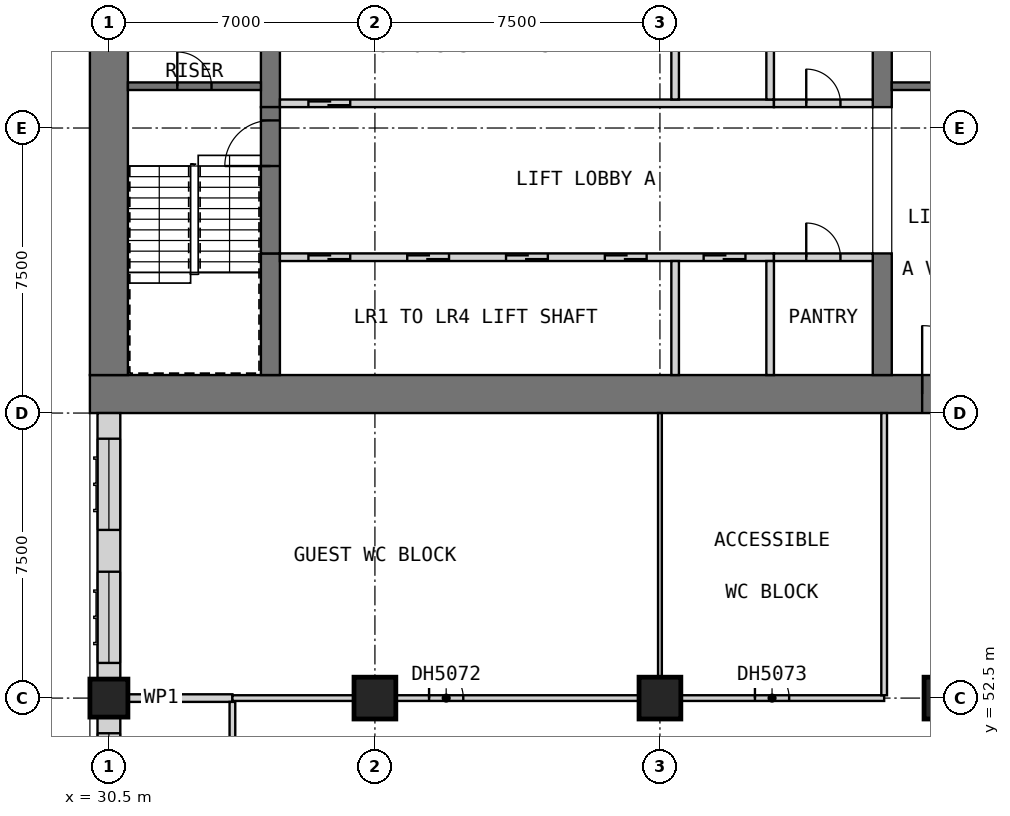
"""IFC4 building model, lengths in metres.
Left out: names, types, materials, properties, quantities, classifications, styles, units other than length and angle.
Written with IfcOpenShell. Run it as: python <this file> out.ifc"""

import sys

from ifc_helpers import new_model, si_unit, direction, frame, frame_2d, origin, origin_2d, place, context, subcontext, project, spatial, rectangle, extrude, element, fill, save


model = new_model("IFC4")
c1 = context("Model", 3, precision=1e-05, world=origin(), true_north=direction((0.0, 1.0)))
c2 = subcontext(c1, "Body", "Model", "MODEL_VIEW")
j1 = project(units=[si_unit("LENGTHUNIT", "METRE"), si_unit("PLANEANGLEUNIT", "RADIAN")], contexts=[c1])
p1 = place(None, origin())
s1 = spatial("IfcSite", under=j1, at=p1, CompositionType="ELEMENT")
p2 = place(p1, origin())
s2 = spatial("IfcBuilding", under=s1, at=p2, CompositionType="ELEMENT")
p3 = place(p2, frame((0.0, 0.0, 93.5)))
s3 = spatial("IfcBuildingStorey", under=s2, at=p3, CompositionType="ELEMENT", Elevation=93.5)
p4 = place(p3, frame((30.5, 52.5, 0.0), z_axis=(0.0, 0.0, 1.0), x_axis=(1.0, 0.0, 0.0)))
e1 = element("IfcColumn", 1, at=p4, inside=s3, PredefinedType="COLUMN", context=c2, shape_type="SweptSolid", body=[
    extrude(rectangle(XDim=1.0, YDim=1.0, at=origin_2d()), origin(), (0.0, 0.0, 1.0), 3.6),
])
for number, where, z_axis, x_axis in (
    (2, (37.5, 52.5, 0.0), (0.0, 0.0, 1.0), (1.0, 0.0, 0.0)),
    (3, (45.0, 52.5, 0.0), (0.0, 0.0, 1.0), (1.0, 0.0, 0.0)),
    (4, (52.5, 52.5, 0.0), (0.0, 0.0, 1.0), (1.0, 0.0, 0.0)),
):
    element("IfcColumn", number, at=place(p3, frame(where, z_axis=z_axis, x_axis=x_axis)), inside=s3, PredefinedType="COLUMN", context=c2, shape_type="SweptSolid", body=[
        extrude(rectangle(XDim=1.1, YDim=1.1, at=origin_2d()), origin(), (0.0, 0.0, 1.0), 3.6),
    ])
p5 = place(p3, frame((30.0, 60.5, 0.0), z_axis=(0.0, 0.0, 1.0), x_axis=(1.0, 0.0, 0.0)))
e5 = element("IfcWall", 5, at=p5, inside=s3, PredefinedType="SHEAR", context=c2, shape_type="SweptSolid", body=[
    extrude(rectangle(XDim=30.0, YDim=1.0, at=frame_2d((15.0, 0.0))), origin(), (0.0, 0.0, 1.0), 3.6),
])
p6 = place(p5, frame((21.9, 0.0, 0.0)))
e6 = element("IfcOpeningElement", 6, at=p6, cuts=e5, PredefinedType="OPENING", context=c2, shape_type="SweptSolid", body=[
    extrude(rectangle(XDim=1.8, YDim=2.1, at=frame_2d((0.9, 1.05))), frame((0.0, 0.51, 0.0), z_axis=(0.0, -1.0, 0.0), x_axis=(1.0, 0.0, 0.0)), (0.0, 0.0, 1.0), 1.02),
])
p7 = place(p5, frame((26.5, 0.0, 0.0)))
e7 = element("IfcOpeningElement", 7, at=p7, cuts=e5, PredefinedType="OPENING", context=c2, shape_type="SweptSolid", body=[
    extrude(rectangle(XDim=1.2, YDim=2.1, at=frame_2d((0.6, 1.05))), frame((0.0, 0.51, 0.0), z_axis=(0.0, -1.0, 0.0), x_axis=(1.0, 0.0, 0.0)), (0.0, 0.0, 1.0), 1.02),
])
p8 = place(p3, frame((30.5, 61.0, 0.0), z_axis=(0.0, 0.0, 1.0), x_axis=(0.0, 1.0, 0.0)))
e8 = element("IfcWall", 8, at=p8, inside=s3, PredefinedType="SHEAR", context=c2, shape_type="SweptSolid", body=[
    extrude(rectangle(XDim=20.5, YDim=1.0, at=frame_2d((10.25, 0.0))), origin(), (0.0, 0.0, 1.0), 3.6),
])
p9 = place(p3, frame((34.75, 61.0, 0.0), z_axis=(0.0, 0.0, 1.0), x_axis=(0.0, 1.0, 0.0)))
e9 = element("IfcWall", 9, at=p9, inside=s3, PredefinedType="SHEAR", context=c2, shape_type="SweptSolid", body=[
    extrude(rectangle(XDim=3.2, YDim=0.5, at=frame_2d((1.6, 0.0))), origin(), (0.0, 0.0, 1.0), 3.6),
])
p10 = place(p3, frame((34.75, 68.05, 0.0), z_axis=(0.0, 0.0, 1.0), x_axis=(0.0, 1.0, 0.0)))
e10 = element("IfcWall", 10, at=p10, inside=s3, PredefinedType="SHEAR", context=c2, shape_type="SweptSolid", body=[
    extrude(rectangle(XDim=6.4, YDim=0.5, at=frame_2d((3.2, 0.0))), origin(), (0.0, 0.0, 1.0), 3.6),
])
p11 = place(p3, frame((50.85, 61.0, 0.0), z_axis=(0.0, 0.0, 1.0), x_axis=(0.0, 1.0, 0.0)))
e11 = element("IfcWall", 11, at=p11, inside=s3, PredefinedType="SHEAR", context=c2, shape_type="SweptSolid", body=[
    extrude(rectangle(XDim=3.2, YDim=0.5, at=frame_2d((1.6, 0.0))), origin(), (0.0, 0.0, 1.0), 3.6),
])
p12 = place(p3, frame((50.85, 68.05, 0.0), z_axis=(0.0, 0.0, 1.0), x_axis=(0.0, 1.0, 0.0)))
e12 = element("IfcWall", 12, at=p12, inside=s3, PredefinedType="SHEAR", context=c2, shape_type="SweptSolid", body=[
    extrude(rectangle(XDim=6.4, YDim=0.5, at=frame_2d((3.2, 0.0))), origin(), (0.0, 0.0, 1.0), 3.6),
])
p13 = place(p2, frame((0.0, 0.0, 34.0)))
s4 = spatial("IfcBuildingStorey", under=s2, at=p13, CompositionType="ELEMENT", Elevation=34.0)
for number, where, z_axis, x_axis in (
    (13, (29.7, 61.05, 0.0), (0.0, 0.0, 1.0), (0.0, 1.0, 0.0)),
    (14, (29.7, 65.925, 0.0), (0.0, 0.0, 1.0), (0.0, 1.0, 0.0)),
):
    element("IfcWall", number, at=place(p13, frame(where, z_axis=z_axis, x_axis=x_axis)), inside=s4, PredefinedType="SOLIDWALL", context=c2, shape_type="SweptSolid", body=[
        extrude(rectangle(XDim=0.9, YDim=0.6, at=frame_2d((0.45, 0.0))), origin(), (0.0, 0.0, 1.0), 286.2),
    ])
p14 = place(p3, frame((30.5, 60.0, 0.0), z_axis=(0.0, 0.0, 1.0), x_axis=(0.0, -1.0, 0.0)))
e15 = element("IfcWall", 15, at=p14, inside=s3, PredefinedType="SOLIDWALL", context=c2, shape_type="SweptSolid", body=[
    extrude(rectangle(XDim=7.0, YDim=0.6, at=frame_2d((3.5, 0.0))), origin(), (0.0, 0.0, 1.0), 3.35),
])
p15 = place(p14, frame((4.175, 0.0, 0.8)))
e16 = element("IfcOpeningElement", 16, at=p15, cuts=e15, PredefinedType="OPENING", context=c2, shape_type="SweptSolid", body=[
    extrude(rectangle(XDim=2.4, YDim=1.8, at=frame_2d((1.2, 0.9))), frame((0.0, 0.31, 0.0), z_axis=(0.0, -1.0, 0.0), x_axis=(1.0, 0.0, 0.0)), (0.0, 0.0, 1.0), 0.62),
])
p16 = place(p14, frame((0.675, 0.0, 0.8)))
e17 = element("IfcOpeningElement", 17, at=p16, cuts=e15, PredefinedType="OPENING", context=c2, shape_type="SweptSolid", body=[
    extrude(rectangle(XDim=2.4, YDim=1.8, at=frame_2d((1.2, 0.9))), frame((0.0, 0.31, 0.0), z_axis=(0.0, -1.0, 0.0), x_axis=(1.0, 0.0, 0.0)), (0.0, 0.0, 1.0), 0.62),
])
p17 = place(p3, frame((30.5, 52.0, 0.0), z_axis=(0.0, 0.0, 1.0), x_axis=(0.0, -1.0, 0.0)))
e18 = element("IfcWall", 18, at=p17, inside=s3, PredefinedType="SOLIDWALL", context=c2, shape_type="SweptSolid", body=[
    extrude(rectangle(XDim=6.0, YDim=0.6, at=frame_2d((3.0, 0.0))), origin(), (0.0, 0.0, 1.0), 2.85),
])
p18 = place(p17, frame((3.425, 0.0, 0.8)))
e19 = element("IfcOpeningElement", 19, at=p18, cuts=e18, PredefinedType="OPENING", context=c2, shape_type="SweptSolid", body=[
    extrude(rectangle(XDim=2.4, YDim=1.8, at=frame_2d((1.2, 0.9))), frame((0.0, 0.31, 0.0), z_axis=(0.0, -1.0, 0.0), x_axis=(1.0, 0.0, 0.0)), (0.0, 0.0, 1.0), 0.62),
])
p19 = place(p17, frame((0.425, 0.0, 0.8)))
e20 = element("IfcOpeningElement", 20, at=p19, cuts=e18, PredefinedType="OPENING", context=c2, shape_type="SweptSolid", body=[
    extrude(rectangle(XDim=2.4, YDim=1.8, at=frame_2d((1.2, 0.9))), frame((0.0, 0.31, 0.0), z_axis=(0.0, -1.0, 0.0), x_axis=(1.0, 0.0, 0.0)), (0.0, 0.0, 1.0), 0.62),
])
p20 = place(p3, frame((35.0, 64.1, 0.0), z_axis=(0.0, 0.0, 1.0), x_axis=(1.0, 0.0, 0.0)))
e21 = element("IfcWall", 21, at=p20, inside=s3, PredefinedType="SOLIDWALL", context=c2, shape_type="SweptSolid", body=[
    extrude(rectangle(XDim=13.0, YDim=0.2, at=frame_2d((6.5, 0.0))), origin(), (0.0, 0.0, 1.0), 3.6),
])
p21 = place(p20, frame((0.75, 0.0, 0.0)))
e22 = element("IfcOpeningElement", 22, at=p21, cuts=e21, PredefinedType="OPENING", context=c2, shape_type="SweptSolid", body=[
    extrude(rectangle(XDim=1.1, YDim=2.1, at=frame_2d((0.55, 1.05))), frame((0.0, 0.11, 0.0), z_axis=(0.0, -1.0, 0.0), x_axis=(1.0, 0.0, 0.0)), (0.0, 0.0, 1.0), 0.22),
])
p22 = place(p20, frame((3.35, 0.0, 0.0)))
e23 = element("IfcOpeningElement", 23, at=p22, cuts=e21, PredefinedType="OPENING", context=c2, shape_type="SweptSolid", body=[
    extrude(rectangle(XDim=1.1, YDim=2.1, at=frame_2d((0.55, 1.05))), frame((0.0, 0.11, 0.0), z_axis=(0.0, -1.0, 0.0), x_axis=(1.0, 0.0, 0.0)), (0.0, 0.0, 1.0), 0.22),
])
p23 = place(p20, frame((5.95, 0.0, 0.0)))
e24 = element("IfcOpeningElement", 24, at=p23, cuts=e21, PredefinedType="OPENING", context=c2, shape_type="SweptSolid", body=[
    extrude(rectangle(XDim=1.1, YDim=2.1, at=frame_2d((0.55, 1.05))), frame((0.0, 0.11, 0.0), z_axis=(0.0, -1.0, 0.0), x_axis=(1.0, 0.0, 0.0)), (0.0, 0.0, 1.0), 0.22),
])
p24 = place(p20, frame((8.55, 0.0, 0.0)))
e25 = element("IfcOpeningElement", 25, at=p24, cuts=e21, PredefinedType="OPENING", context=c2, shape_type="SweptSolid", body=[
    extrude(rectangle(XDim=1.1, YDim=2.1, at=frame_2d((0.55, 1.05))), frame((0.0, 0.11, 0.0), z_axis=(0.0, -1.0, 0.0), x_axis=(1.0, 0.0, 0.0)), (0.0, 0.0, 1.0), 0.22),
])
p25 = place(p20, frame((11.15, 0.0, 0.0)))
e26 = element("IfcOpeningElement", 26, at=p25, cuts=e21, PredefinedType="OPENING", context=c2, shape_type="SweptSolid", body=[
    extrude(rectangle(XDim=1.1, YDim=2.1, at=frame_2d((0.55, 1.05))), frame((0.0, 0.11, 0.0), z_axis=(0.0, -1.0, 0.0), x_axis=(1.0, 0.0, 0.0)), (0.0, 0.0, 1.0), 0.22),
])
for number, where, z_axis, x_axis in (
    (27, (45.4, 61.0, 0.0), (0.0, 0.0, 1.0), (0.0, 1.0, 0.0)),
    (28, (47.9, 61.0, 0.0), (0.0, 0.0, 1.0), (0.0, 1.0, 0.0)),
):
    element("IfcWall", number, at=place(p3, frame(where, z_axis=z_axis, x_axis=x_axis)), inside=s3, PredefinedType="SOLIDWALL", context=c2, shape_type="SweptSolid", body=[
        extrude(rectangle(XDim=3.0, YDim=0.2, at=frame_2d((1.5, 0.0))), origin(), (0.0, 0.0, 1.0), 3.6),
    ])
p26 = place(p3, frame((48.0, 64.1, 0.0), z_axis=(0.0, 0.0, 1.0), x_axis=(1.0, 0.0, 0.0)))
e29 = element("IfcWall", 29, at=p26, inside=s3, PredefinedType="PARTITIONING", context=c2, shape_type="SweptSolid", body=[
    extrude(rectangle(XDim=2.6, YDim=0.2, at=frame_2d((1.3, 0.0))), origin(), (0.0, 0.0, 1.0), 3.35),
])
p27 = place(p26, frame((0.85, 0.0, 0.0)))
e30 = element("IfcOpeningElement", 30, at=p27, cuts=e29, PredefinedType="OPENING", context=c2, shape_type="SweptSolid", body=[
    extrude(rectangle(XDim=0.9, YDim=2.1, at=frame_2d((0.45, 1.05))), frame((0.0, 0.11, 0.0), z_axis=(0.0, -1.0, 0.0), x_axis=(1.0, 0.0, 0.0)), (0.0, 0.0, 1.0), 0.22),
])
p28 = place(p3, frame((35.0, 68.15, 0.0), z_axis=(0.0, 0.0, 1.0), x_axis=(1.0, 0.0, 0.0)))
e31 = element("IfcWall", 31, at=p28, inside=s3, PredefinedType="SOLIDWALL", context=c2, shape_type="SweptSolid", body=[
    extrude(rectangle(XDim=13.0, YDim=0.2, at=frame_2d((6.5, 0.0))), origin(), (0.0, 0.0, 1.0), 3.6),
])
p29 = place(p28, frame((0.75, 0.0, 0.0)))
e32 = element("IfcOpeningElement", 32, at=p29, cuts=e31, PredefinedType="OPENING", context=c2, shape_type="SweptSolid", body=[
    extrude(rectangle(XDim=1.1, YDim=2.1, at=frame_2d((0.55, 1.05))), frame((0.0, 0.11, 0.0), z_axis=(0.0, -1.0, 0.0), x_axis=(1.0, 0.0, 0.0)), (0.0, 0.0, 1.0), 0.22),
])
for number, where, z_axis, x_axis in (
    (33, (45.4, 68.25, 0.0), (0.0, 0.0, 1.0), (0.0, 1.0, 0.0)),
    (34, (47.9, 68.25, 0.0), (0.0, 0.0, 1.0), (0.0, 1.0, 0.0)),
):
    element("IfcWall", number, at=place(p3, frame(where, z_axis=z_axis, x_axis=x_axis)), inside=s3, PredefinedType="SOLIDWALL", context=c2, shape_type="SweptSolid", body=[
        extrude(rectangle(XDim=2.75, YDim=0.2, at=frame_2d((1.375, 0.0))), origin(), (0.0, 0.0, 1.0), 3.6),
    ])
p30 = place(p3, frame((48.0, 68.15, 0.0), z_axis=(0.0, 0.0, 1.0), x_axis=(1.0, 0.0, 0.0)))
e35 = element("IfcWall", 35, at=p30, inside=s3, PredefinedType="PARTITIONING", context=c2, shape_type="SweptSolid", body=[
    extrude(rectangle(XDim=2.6, YDim=0.2, at=frame_2d((1.3, 0.0))), origin(), (0.0, 0.0, 1.0), 3.35),
])
p31 = place(p30, frame((0.85, 0.0, 0.0)))
e36 = element("IfcOpeningElement", 36, at=p31, cuts=e35, PredefinedType="OPENING", context=c2, shape_type="SweptSolid", body=[
    extrude(rectangle(XDim=0.9, YDim=2.1, at=frame_2d((0.45, 1.05))), frame((0.0, 0.11, 0.0), z_axis=(0.0, -1.0, 0.0), x_axis=(1.0, 0.0, 0.0)), (0.0, 0.0, 1.0), 0.22),
])
p32 = place(p3, frame((34.75, 64.2, 0.0), z_axis=(0.0, 0.0, 1.0), x_axis=(0.0, 1.0, 0.0)))
e37 = element("IfcWall", 37, at=p32, inside=s3, PredefinedType="SOLIDWALL", context=c2, shape_type="SweptSolid", body=[
    extrude(rectangle(XDim=3.85, YDim=0.5, at=frame_2d((1.925, 0.0))), origin(), (0.0, 0.0, 1.0), 2.4),
])
p33 = place(p32, frame((2.3, 0.0, 0.0)))
e38 = element("IfcOpeningElement", 38, at=p33, cuts=e37, PredefinedType="OPENING", context=c2, shape_type="SweptSolid", body=[
    extrude(rectangle(XDim=1.2, YDim=2.1, at=frame_2d((0.6, 1.05))), frame((0.0, 0.26, 0.0), z_axis=(0.0, -1.0, 0.0), x_axis=(1.0, 0.0, 0.0)), (0.0, 0.0, 1.0), 0.52),
])
p34 = place(p3, frame((31.0, 68.6, 0.0), z_axis=(0.0, 0.0, 1.0), x_axis=(1.0, 0.0, 0.0)))
e39 = element("IfcWall", 39, at=p34, inside=s3, PredefinedType="SOLIDWALL", context=c2, shape_type="SweptSolid", body=[
    extrude(rectangle(XDim=3.5, YDim=0.2, at=frame_2d((1.75, 0.0))), origin(), (0.0, 0.0, 1.0), 3.35),
])
p35 = place(p34, frame((1.3, 0.0, 0.0)))
e40 = element("IfcOpeningElement", 40, at=p35, cuts=e39, PredefinedType="OPENING", context=c2, shape_type="SweptSolid", body=[
    extrude(rectangle(XDim=0.9, YDim=2.1, at=frame_2d((0.45, 1.05))), frame((0.0, 0.11, 0.0), z_axis=(0.0, -1.0, 0.0), x_axis=(1.0, 0.0, 0.0)), (0.0, 0.0, 1.0), 0.22),
])
p36 = place(p3, frame((51.1, 68.6, 0.0), z_axis=(0.0, 0.0, 1.0), x_axis=(1.0, 0.0, 0.0)))
e41 = element("IfcWall", 41, at=p36, inside=s3, PredefinedType="SOLIDWALL", context=c2, shape_type="SweptSolid", body=[
    extrude(rectangle(XDim=7.9, YDim=0.2, at=frame_2d((3.95, 0.0))), origin(), (0.0, 0.0, 1.0), 3.35),
])
p37 = place(p3, frame((30.0, 52.5, 0.0), z_axis=(0.0, 0.0, 1.0), x_axis=(1.0, 0.0, 0.0)))
e42 = element("IfcWall", 42, at=p37, inside=s3, PredefinedType="PARTITIONING", context=c2, shape_type="SweptSolid", body=[
    extrude(rectangle(XDim=3.75, YDim=0.2, at=frame_2d((1.875, 0.0))), origin(), (0.0, 0.0, 1.0), 3.35),
])
p38 = place(p3, frame((33.75, 52.5, 0.0), z_axis=(0.0, 0.0, 1.0), x_axis=(1.0, 0.0, 0.0)))
e43 = element("IfcWall", 43, at=p38, inside=s3, PredefinedType="PARTITIONING", context=c2, shape_type="SweptSolid", body=[
    extrude(rectangle(XDim=17.15, YDim=0.15, at=frame_2d((8.575, 0.0))), origin(), (0.0, 0.0, 1.0), 3.35),
])
p39 = place(p38, frame((5.175, 0.0, 0.0)))
e44 = element("IfcOpeningElement", 44, at=p39, cuts=e43, PredefinedType="OPENING", context=c2, shape_type="SweptSolid", body=[
    extrude(rectangle(XDim=0.9, YDim=2.1, at=frame_2d((0.45, 1.05))), frame((0.0, 0.085, 0.0), z_axis=(0.0, -1.0, 0.0), x_axis=(1.0, 0.0, 0.0)), (0.0, 0.0, 1.0), 0.17),
])
p40 = place(p38, frame((13.75, 0.0, 0.0)))
e45 = element("IfcOpeningElement", 45, at=p40, cuts=e43, PredefinedType="OPENING", context=c2, shape_type="SweptSolid", body=[
    extrude(rectangle(XDim=0.9, YDim=2.1, at=frame_2d((0.45, 1.05))), frame((0.0, 0.085, 0.0), z_axis=(0.0, -1.0, 0.0), x_axis=(1.0, 0.0, 0.0)), (0.0, 0.0, 1.0), 0.17),
])
p41 = place(p3, frame((33.75, 50.175, 0.0), z_axis=(0.0, 0.0, 1.0), x_axis=(0.0, 1.0, 0.0)))
e46 = element("IfcWall", 46, at=p41, inside=s3, PredefinedType="PARTITIONING", context=c2, shape_type="SweptSolid", body=[
    extrude(rectangle(XDim=2.225, YDim=0.15, at=frame_2d((1.112, 0.0))), origin(), (0.0, 0.0, 1.0), 3.35),
])
p42 = place(p3, frame((45.0, 52.575, 0.0), z_axis=(0.0, 0.0, 1.0), x_axis=(0.0, 1.0, 0.0)))
e47 = element("IfcWall", 47, at=p42, inside=s3, PredefinedType="PARTITIONING", context=c2, shape_type="SweptSolid", body=[
    extrude(rectangle(XDim=7.425, YDim=0.1, at=frame_2d((3.712, 0.0))), origin(), (0.0, 0.0, 1.0), 3.35),
])
p43 = place(p3, frame((50.9, 52.575, 0.0), z_axis=(0.0, 0.0, 1.0), x_axis=(0.0, 1.0, 0.0)))
e48 = element("IfcWall", 48, at=p43, inside=s3, PredefinedType="PARTITIONING", context=c2, shape_type="SweptSolid", body=[
    extrude(rectangle(XDim=7.425, YDim=0.15, at=frame_2d((3.712, 0.0))), origin(), (0.0, 0.0, 1.0), 3.35),
])
p44 = place(p15, origin())
e49 = element("IfcWindow", 49, at=p44, inside=s3, PartitioningType="SINGLE_PANEL", PredefinedType="WINDOW", context=c2, shape_type="SweptSolid", body=[
    extrude(rectangle(XDim=2.4, YDim=1.8, at=frame_2d((1.2, 0.9))), frame((0.0, -0.07, 0.0), z_axis=(0.0, -1.0, 0.0), x_axis=(1.0, 0.0, 0.0)), (0.0, 0.0, 1.0), 0.06),
])
fill(e16, e49)
p45 = place(p16, origin())
e50 = element("IfcWindow", 50, at=p45, inside=s3, PartitioningType="SINGLE_PANEL", PredefinedType="WINDOW", context=c2, shape_type="SweptSolid", body=[
    extrude(rectangle(XDim=2.4, YDim=1.8, at=frame_2d((1.2, 0.9))), frame((0.0, -0.07, 0.0), z_axis=(0.0, -1.0, 0.0), x_axis=(1.0, 0.0, 0.0)), (0.0, 0.0, 1.0), 0.06),
])
fill(e17, e50)
p46 = place(p19, origin())
e51 = element("IfcWindow", 51, at=p46, inside=s3, PartitioningType="SINGLE_PANEL", PredefinedType="WINDOW", context=c2, shape_type="SweptSolid", body=[
    extrude(rectangle(XDim=2.4, YDim=1.8, at=frame_2d((1.2, 0.9))), frame((0.0, -0.07, 0.0), z_axis=(0.0, -1.0, 0.0), x_axis=(1.0, 0.0, 0.0)), (0.0, 0.0, 1.0), 0.06),
])
fill(e20, e51)
p47 = place(p21, origin())
e52 = element("IfcDoor", 52, at=p47, inside=s3, OperationType="DOUBLE_DOOR_SLIDING", PredefinedType="DOOR", context=c2, shape_type="SweptSolid", body=[
    extrude(rectangle(XDim=1.1, YDim=2.1, at=frame_2d((0.55, 1.05))), frame((0.0, 0.025, 0.0), z_axis=(0.0, -1.0, 0.0), x_axis=(1.0, 0.0, 0.0)), (0.0, 0.0, 1.0), 0.05),
])
fill(e22, e52)
p48 = place(p22, origin())
e53 = element("IfcDoor", 53, at=p48, inside=s3, OperationType="DOUBLE_DOOR_SLIDING", PredefinedType="DOOR", context=c2, shape_type="SweptSolid", body=[
    extrude(rectangle(XDim=1.1, YDim=2.1, at=frame_2d((0.55, 1.05))), frame((0.0, 0.025, 0.0), z_axis=(0.0, -1.0, 0.0), x_axis=(1.0, 0.0, 0.0)), (0.0, 0.0, 1.0), 0.05),
])
fill(e23, e53)
p49 = place(p23, origin())
e54 = element("IfcDoor", 54, at=p49, inside=s3, OperationType="DOUBLE_DOOR_SLIDING", PredefinedType="DOOR", context=c2, shape_type="SweptSolid", body=[
    extrude(rectangle(XDim=1.1, YDim=2.1, at=frame_2d((0.55, 1.05))), frame((0.0, 0.025, 0.0), z_axis=(0.0, -1.0, 0.0), x_axis=(1.0, 0.0, 0.0)), (0.0, 0.0, 1.0), 0.05),
])
fill(e24, e54)
p50 = place(p24, origin())
e55 = element("IfcDoor", 55, at=p50, inside=s3, OperationType="DOUBLE_DOOR_SLIDING", PredefinedType="DOOR", context=c2, shape_type="SweptSolid", body=[
    extrude(rectangle(XDim=1.1, YDim=2.1, at=frame_2d((0.55, 1.05))), frame((0.0, 0.025, 0.0), z_axis=(0.0, -1.0, 0.0), x_axis=(1.0, 0.0, 0.0)), (0.0, 0.0, 1.0), 0.05),
])
fill(e25, e55)
p51 = place(p25, origin())
e56 = element("IfcDoor", 56, at=p51, inside=s3, OperationType="DOUBLE_DOOR_SLIDING", PredefinedType="DOOR", context=c2, shape_type="SweptSolid", body=[
    extrude(rectangle(XDim=1.1, YDim=2.1, at=frame_2d((0.55, 1.05))), frame((0.0, 0.025, 0.0), z_axis=(0.0, -1.0, 0.0), x_axis=(1.0, 0.0, 0.0)), (0.0, 0.0, 1.0), 0.05),
])
fill(e26, e56)
p52 = place(p27, origin())
e57 = element("IfcDoor", 57, at=p52, inside=s3, OperationType="SINGLE_SWING_RIGHT", PredefinedType="DOOR", context=c2, shape_type="SweptSolid", body=[
    extrude(rectangle(XDim=0.9, YDim=2.1, at=frame_2d((0.45, 1.05))), frame((0.0, 0.025, 0.0), z_axis=(0.0, -1.0, 0.0), x_axis=(1.0, 0.0, 0.0)), (0.0, 0.0, 1.0), 0.05),
])
fill(e30, e57)
p53 = place(p29, origin())
e58 = element("IfcDoor", 58, at=p53, inside=s3, OperationType="DOUBLE_DOOR_SLIDING", PredefinedType="DOOR", context=c2, shape_type="SweptSolid", body=[
    extrude(rectangle(XDim=1.1, YDim=2.1, at=frame_2d((0.55, 1.05))), frame((0.0, 0.025, 0.0), z_axis=(0.0, -1.0, 0.0), x_axis=(1.0, 0.0, 0.0)), (0.0, 0.0, 1.0), 0.05),
])
fill(e32, e58)
p54 = place(p31, origin())
e59 = element("IfcDoor", 59, at=p54, inside=s3, OperationType="SINGLE_SWING_RIGHT", PredefinedType="DOOR", context=c2, shape_type="SweptSolid", body=[
    extrude(rectangle(XDim=0.9, YDim=2.1, at=frame_2d((0.45, 1.05))), frame((0.0, 0.025, 0.0), z_axis=(0.0, -1.0, 0.0), x_axis=(1.0, 0.0, 0.0)), (0.0, 0.0, 1.0), 0.05),
])
fill(e36, e59)
p55 = place(p6, origin())
e60 = element("IfcDoor", 60, at=p55, inside=s3, OperationType="DOUBLE_DOOR_SINGLE_SWING", PredefinedType="DOOR", context=c2, shape_type="SweptSolid", body=[
    extrude(rectangle(XDim=1.8, YDim=2.1, at=frame_2d((0.9, 1.05))), frame((0.0, 0.025, 0.0), z_axis=(0.0, -1.0, 0.0), x_axis=(1.0, 0.0, 0.0)), (0.0, 0.0, 1.0), 0.05),
])
fill(e6, e60)
p56 = place(p33, origin())
e61 = element("IfcDoor", 61, at=p56, inside=s3, OperationType="SINGLE_SWING_LEFT", PredefinedType="DOOR", context=c2, shape_type="SweptSolid", body=[
    extrude(rectangle(XDim=1.2, YDim=2.1, at=frame_2d((0.6, 1.05))), frame((0.0, 0.025, 0.0), z_axis=(0.0, -1.0, 0.0), x_axis=(1.0, 0.0, 0.0)), (0.0, 0.0, 1.0), 0.05),
])
fill(e38, e61)
p57 = place(p35, origin())
e62 = element("IfcDoor", 62, at=p57, inside=s3, OperationType="SINGLE_SWING_LEFT", PredefinedType="DOOR", context=c2, shape_type="SweptSolid", body=[
    extrude(rectangle(XDim=0.9, YDim=2.1, at=frame_2d((0.45, 1.05))), frame((0.0, 0.025, 0.0), z_axis=(0.0, -1.0, 0.0), x_axis=(1.0, 0.0, 0.0)), (0.0, 0.0, 1.0), 0.05),
])
fill(e40, e62)
p58 = place(p39, origin())
e63 = element("IfcDoor", 63, at=p58, inside=s3, OperationType="SINGLE_SWING_LEFT", PredefinedType="DOOR", context=c2, shape_type="SweptSolid", body=[
    extrude(rectangle(XDim=0.9, YDim=2.1, at=frame_2d((0.45, 1.05))), frame((0.0, 0.025, 0.0), z_axis=(0.0, -1.0, 0.0), x_axis=(1.0, 0.0, 0.0)), (0.0, 0.0, 1.0), 0.05),
])
fill(e44, e63)
p59 = place(p40, origin())
e64 = element("IfcDoor", 64, at=p59, inside=s3, OperationType="SINGLE_SWING_LEFT", PredefinedType="DOOR", context=c2, shape_type="SweptSolid", body=[
    extrude(rectangle(XDim=0.9, YDim=2.1, at=frame_2d((0.45, 1.05))), frame((0.0, 0.025, 0.0), z_axis=(0.0, -1.0, 0.0), x_axis=(1.0, 0.0, 0.0)), (0.0, 0.0, 1.0), 0.05),
])
fill(e45, e64)
save(model, sys.argv[1])
